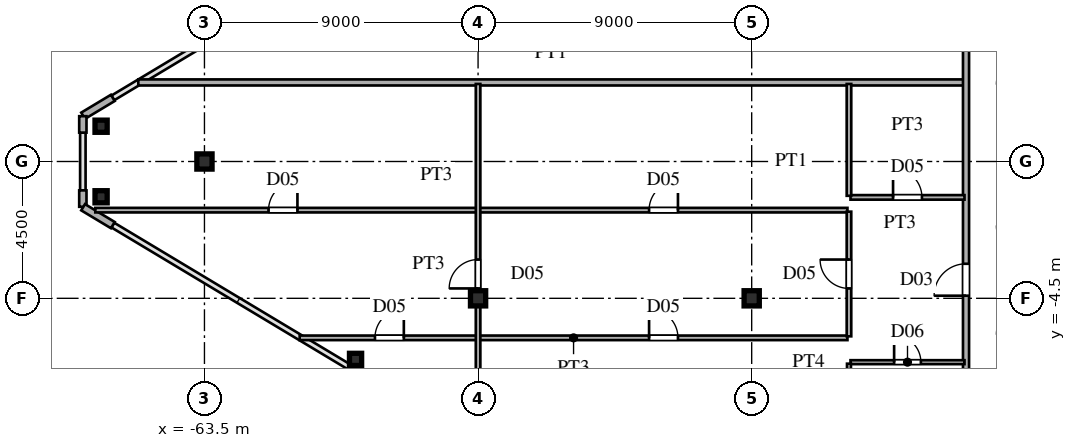
"""IFC4 building model, lengths in metres.
Left out: names, types, materials, properties, quantities, classifications, styles, units other than length and angle.
Written with IfcOpenShell. Run it as: python <this file> out.ifc"""

import sys

from ifc_helpers import new_model, si_unit, direction, frame, frame_2d, origin, origin_2d, place, context, subcontext, project, spatial, rectangle, hollow_rectangle, i_section, extrude, source, transform, mapped, element, fill, save


model = new_model("IFC4")
c1 = context("Model", 3, precision=1e-05, world=origin(), true_north=direction((0.0, 1.0)))
c2 = subcontext(c1, "Body", "Model", "MODEL_VIEW")
j1 = project(units=[si_unit("LENGTHUNIT", "METRE"), si_unit("PLANEANGLEUNIT", "RADIAN")], contexts=[c1])
p1 = place(None, origin())
s1 = spatial("IfcSite", under=j1, at=p1, CompositionType="ELEMENT")
p2 = place(p1, origin())
s2 = spatial("IfcBuilding", under=s1, at=p2, CompositionType="ELEMENT")
p3 = place(p2, frame((0.0, 0.0, 210.3)))
s3 = spatial("IfcBuildingStorey", under=s2, at=p3, CompositionType="ELEMENT", Elevation=210.3)
m1 = source(origin(), c2, "Body", "SweptSolid", [
    extrude(i_section(OverallWidth=0.5, OverallDepth=0.5, WebThickness=0.02, FlangeThickness=0.032, at=origin_2d()), origin(), (0.0, 0.0, 1.0), 3.6),
])
for number, where, z_axis, x_axis in (
    (1, (-45.5, -4.5, 0.0), (0.0, 0.0, 1.0), (1.0, 0.0, 0.0)),
    (2, (-54.5, -4.5, 0.0), (0.0, 0.0, 1.0), (1.0, 0.0, 0.0)),
    (3, (-63.5, 0.0, 0.0), (0.0, 0.0, 1.0), (1.0, 0.0, 0.0)),
):
    element("IfcColumn", number, at=place(p3, frame(where, z_axis=z_axis, x_axis=x_axis)), inside=s3, PredefinedType="COLUMN", context=c2, shape_type="MappedRepresentation", body=[
        mapped(m1, transform((0.0, 0.0, 0.0), scale=1.0)),
    ])
m2 = source(origin(), c2, "Body", "SweptSolid", [
    extrude(hollow_rectangle(XDim=0.4, YDim=0.4, WallThickness=0.016, at=origin_2d()), origin(), (0.0, 0.0, 1.0), 3.6),
])
for number, where, z_axis, x_axis in (
    (4, (-66.9, 1.16, 0.0), (0.0, 0.0, 1.0), (1.0, 0.0, 0.0)),
    (5, (-66.9, -1.16, 0.0), (0.0, 0.0, 1.0), (1.0, 0.0, 0.0)),
    (6, (-58.53, -6.509, 0.0), (0.0, 0.0, 1.0), (1.0, 0.0, 0.0)),
):
    element("IfcColumn", number, at=place(p3, frame(where, z_axis=z_axis, x_axis=x_axis)), inside=s3, PredefinedType="COLUMN", context=c2, shape_type="MappedRepresentation", body=[
        mapped(m2, transform((0.0, 0.0, 0.0), scale=1.0)),
    ])
p4 = place(p3, frame((-66.514, 2.092, 0.0), z_axis=(0.0, 0.0, 1.0), x_axis=(-0.85743623509, -0.514590228002, 0.0)))
e7 = element("IfcWall", 7, at=p4, inside=s3, PredefinedType="SOLIDWALL", context=c2, shape_type="SweptSolid", body=[
    extrude(rectangle(XDim=1.14, YDim=0.24, at=frame_2d((0.57, 0.0))), origin(), (0.0, 0.0, 1.0), 3.38),
])
for number, where, z_axis, x_axis in (
    (8, (-67.5, 1.49, 0.0), (0.0, 0.0, 1.0), (0.0, -1.0, 0.0)),
    (9, (-67.5, -0.95, 0.0), (0.0, 0.0, 1.0), (0.0, -1.0, 0.0)),
):
    element("IfcWall", number, at=place(p3, frame(where, z_axis=z_axis, x_axis=x_axis)), inside=s3, PredefinedType="SOLIDWALL", context=c2, shape_type="SweptSolid", body=[
        extrude(rectangle(XDim=0.54, YDim=0.24, at=frame_2d((0.27, 0.0))), origin(), (0.0, 0.0, 1.0), 3.38),
    ])
p5 = place(p3, frame((-67.491, -1.505, 0.0), z_axis=(0.0, 0.0, 1.0), x_axis=(0.85743623509, -0.514590228002, 0.0)))
e10 = element("IfcWall", 10, at=p5, inside=s3, PredefinedType="SOLIDWALL", context=c2, shape_type="SweptSolid", body=[
    extrude(rectangle(XDim=1.14, YDim=0.24, at=frame_2d((0.57, 0.0))), origin(), (0.0, 0.0, 1.0), 3.38),
])
p6 = place(p3, frame((-42.25, -6.6, 0.0), z_axis=(0.0, 0.0, 1.0), x_axis=(1.0, 0.0, 0.0)))
e11 = element("IfcWall", 11, at=p6, inside=s3, PredefinedType="PARTITIONING", context=c2, shape_type="SweptSolid", body=[
    extrude(rectangle(XDim=3.75, YDim=0.13, at=frame_2d((1.875, 0.0))), origin(), (0.0, 0.0, 1.0), 3.38),
])
p7 = place(p6, frame((1.435, 0.0, 0.0)))
e12 = element("IfcOpeningElement", 12, at=p7, cuts=e11, PredefinedType="OPENING", context=c2, shape_type="SweptSolid", body=[
    extrude(rectangle(XDim=0.88, YDim=2.1, at=frame_2d((0.44, 1.05))), frame((0.0, 0.075, 0.0), z_axis=(0.0, -1.0, 0.0), x_axis=(1.0, 0.0, 0.0)), (0.0, 0.0, 1.0), 0.15),
])
p8 = place(p3, frame((-60.368, -5.8, 0.0), z_axis=(0.0, 0.0, 1.0), x_axis=(1.0, 0.0, 0.0)))
e13 = element("IfcWall", 13, at=p8, inside=s3, PredefinedType="PARTITIONING", context=c2, shape_type="SweptSolid", body=[
    extrude(rectangle(XDim=18.018, YDim=0.15, at=frame_2d((9.009, 0.0))), origin(), (0.0, 0.0, 1.0), 3.38),
])
p9 = place(p8, frame((11.493, 0.0, 0.0)))
e14 = element("IfcOpeningElement", 14, at=p9, cuts=e13, PredefinedType="OPENING", context=c2, shape_type="SweptSolid", body=[
    extrude(rectangle(XDim=0.95, YDim=2.15, at=frame_2d((0.475, 1.075))), frame((0.0, 0.085, 0.0), z_axis=(0.0, -1.0, 0.0), x_axis=(1.0, 0.0, 0.0)), (0.0, 0.0, 1.0), 0.17),
])
p10 = place(p8, frame((2.476, 0.0, 0.0)))
e15 = element("IfcOpeningElement", 15, at=p10, cuts=e13, PredefinedType="OPENING", context=c2, shape_type="SweptSolid", body=[
    extrude(rectangle(XDim=0.95, YDim=2.15, at=frame_2d((0.475, 1.075))), frame((0.0, 0.085, 0.0), z_axis=(0.0, -1.0, 0.0), x_axis=(1.0, 0.0, 0.0)), (0.0, 0.0, 1.0), 0.17),
])
p11 = place(p3, frame((-67.09, -1.6, 0.0), z_axis=(0.0, 0.0, 1.0), x_axis=(1.0, 0.0, 0.0)))
e16 = element("IfcWall", 16, at=p11, inside=s3, PredefinedType="PARTITIONING", context=c2, shape_type="SweptSolid", body=[
    extrude(rectangle(XDim=24.74, YDim=0.15, at=frame_2d((12.37, 0.0))), origin(), (0.0, 0.0, 1.0), 3.38),
])
p12 = place(p11, frame((18.215, 0.0, 0.0)))
e17 = element("IfcOpeningElement", 17, at=p12, cuts=e16, PredefinedType="OPENING", context=c2, shape_type="SweptSolid", body=[
    extrude(rectangle(XDim=0.95, YDim=2.15, at=frame_2d((0.475, 1.075))), frame((0.0, 0.085, 0.0), z_axis=(0.0, -1.0, 0.0), x_axis=(1.0, 0.0, 0.0)), (0.0, 0.0, 1.0), 0.17),
])
p13 = place(p11, frame((5.698, 0.0, 0.0)))
e18 = element("IfcOpeningElement", 18, at=p13, cuts=e16, PredefinedType="OPENING", context=c2, shape_type="SweptSolid", body=[
    extrude(rectangle(XDim=0.95, YDim=2.15, at=frame_2d((0.475, 1.075))), frame((0.0, 0.085, 0.0), z_axis=(0.0, -1.0, 0.0), x_axis=(1.0, 0.0, 0.0)), (0.0, 0.0, 1.0), 0.17),
])
p14 = place(p3, frame((-42.25, -1.18, 0.0), z_axis=(0.0, 0.0, 1.0), x_axis=(1.0, 0.0, 0.0)))
e19 = element("IfcWall", 19, at=p14, inside=s3, PredefinedType="PARTITIONING", context=c2, shape_type="SweptSolid", body=[
    extrude(rectangle(XDim=3.75, YDim=0.15, at=frame_2d((1.875, 0.0))), origin(), (0.0, 0.0, 1.0), 3.38),
])
p15 = place(p14, frame((1.4, 0.0, 0.0)))
e20 = element("IfcOpeningElement", 20, at=p15, cuts=e19, PredefinedType="OPENING", context=c2, shape_type="SweptSolid", body=[
    extrude(rectangle(XDim=0.95, YDim=2.15, at=frame_2d((0.475, 1.075))), frame((0.0, 0.085, 0.0), z_axis=(0.0, -1.0, 0.0), x_axis=(1.0, 0.0, 0.0)), (0.0, 0.0, 1.0), 0.17),
])
p16 = place(p3, frame((-65.676, 2.6, 0.0), z_axis=(0.0, 0.0, 1.0), x_axis=(1.0, 0.0, 0.0)))
e21 = element("IfcWall", 21, at=p16, inside=s3, PredefinedType="PARTITIONING", context=c2, shape_type="SweptSolid", body=[
    extrude(rectangle(XDim=27.146, YDim=0.2, at=frame_2d((13.573, 0.0))), origin(), (0.0, 0.0, 1.0), 3.38),
])
p17 = place(p3, frame((-54.5, -9.335, 0.0), z_axis=(0.0, 0.0, 1.0), x_axis=(0.0, 1.0, 0.0)))
e22 = element("IfcWall", 22, at=p17, inside=s3, PredefinedType="PARTITIONING", context=c2, shape_type="SweptSolid", body=[
    extrude(rectangle(XDim=11.885, YDim=0.15, at=frame_2d((5.942, 0.0))), origin(), (0.0, 0.0, 1.0), 2.78),
])
p18 = place(p17, frame((5.16, 0.0, 0.0)))
e23 = element("IfcOpeningElement", 23, at=p18, cuts=e22, PredefinedType="OPENING", context=c2, shape_type="SweptSolid", body=[
    extrude(rectangle(XDim=0.95, YDim=2.15, at=frame_2d((0.475, 1.075))), frame((0.0, 0.085, 0.0), z_axis=(0.0, -1.0, 0.0), x_axis=(1.0, 0.0, 0.0)), (0.0, 0.0, 1.0), 0.17),
])
p19 = place(p3, frame((-42.3, -9.95, 0.0), z_axis=(0.0, 0.0, 1.0), x_axis=(0.0, 1.0, 0.0)))
e24 = element("IfcWall", 24, at=p19, inside=s3, PredefinedType="PARTITIONING", context=c2, shape_type="SweptSolid", body=[
    extrude(rectangle(XDim=3.3, YDim=0.13, at=frame_2d((1.65, 0.0))), origin(), (0.0, 0.0, 1.0), 3.38),
])
p20 = place(p3, frame((-42.3, -5.75, 0.0), z_axis=(0.0, 0.0, 1.0), x_axis=(0.0, 1.0, 0.0)))
e25 = element("IfcWall", 25, at=p20, inside=s3, PredefinedType="PARTITIONING", context=c2, shape_type="SweptSolid", body=[
    extrude(rectangle(XDim=4.1, YDim=0.15, at=frame_2d((2.05, 0.0))), origin(), (0.0, 0.0, 1.0), 3.38),
])
p21 = place(p20, frame((1.575, 0.0, 0.0)))
e26 = element("IfcOpeningElement", 26, at=p21, cuts=e25, PredefinedType="OPENING", context=c2, shape_type="SweptSolid", body=[
    extrude(rectangle(XDim=0.95, YDim=2.15, at=frame_2d((0.475, 1.075))), frame((0.0, 0.085, 0.0), z_axis=(0.0, -1.0, 0.0), x_axis=(1.0, 0.0, 0.0)), (0.0, 0.0, 1.0), 0.17),
])
p22 = place(p3, frame((-42.3, -1.128, 0.0), z_axis=(0.0, 0.0, 1.0), x_axis=(0.0, 1.0, 0.0)))
e27 = element("IfcWall", 27, at=p22, inside=s3, PredefinedType="PARTITIONING", context=c2, shape_type="SweptSolid", body=[
    extrude(rectangle(XDim=3.678, YDim=0.15, at=frame_2d((1.839, 0.0))), origin(), (0.0, 0.0, 1.0), 3.38),
])
p23 = place(p3, frame((-38.45, -15.715, 0.0), z_axis=(0.0, 0.0, 1.0), x_axis=(0.0, 1.0, 0.0)))
e28 = element("IfcWall", 28, at=p23, inside=s3, PredefinedType="PARTITIONING", context=c2, shape_type="SweptSolid", body=[
    extrude(rectangle(XDim=31.43, YDim=0.2, at=frame_2d((15.715, 0.0))), origin(), (0.0, 0.0, 1.0), 3.38),
])
p24 = place(p23, frame((2.29, 0.0, 0.0)))
e29 = element("IfcOpeningElement", 29, at=p24, cuts=e28, PredefinedType="OPENING", context=c2, shape_type="SweptSolid", body=[
    extrude(rectangle(XDim=1.05, YDim=2.25, at=frame_2d((0.525, 1.125))), frame((0.0, 0.11, 0.0), z_axis=(0.0, -1.0, 0.0), x_axis=(1.0, 0.0, 0.0)), (0.0, 0.0, 1.0), 0.22),
])
p25 = place(p23, frame((11.301, 0.0, 0.0)))
e30 = element("IfcOpeningElement", 30, at=p25, cuts=e28, PredefinedType="OPENING", context=c2, shape_type="SweptSolid", body=[
    extrude(rectangle(XDim=1.05, YDim=2.25, at=frame_2d((0.525, 1.125))), frame((0.0, 0.11, 0.0), z_axis=(0.0, -1.0, 0.0), x_axis=(1.0, 0.0, 0.0)), (0.0, 0.0, 1.0), 0.22),
])
p26 = place(p23, frame((24.39, 0.0, 0.0)))
e31 = element("IfcOpeningElement", 31, at=p26, cuts=e28, PredefinedType="OPENING", context=c2, shape_type="SweptSolid", body=[
    extrude(rectangle(XDim=1.05, YDim=2.25, at=frame_2d((0.525, 1.125))), frame((0.0, 0.11, 0.0), z_axis=(0.0, -1.0, 0.0), x_axis=(1.0, 0.0, 0.0)), (0.0, 0.0, 1.0), 0.22),
])
m3 = source(origin(), c2, "Body", "SweptSolid", [
    extrude(rectangle(XDim=0.88, YDim=2.1, at=frame_2d((0.44, 1.05))), frame((0.0, 0.025, 0.0), z_axis=(0.0, -1.0, 0.0), x_axis=(1.0, 0.0, 0.0)), (0.0, 0.0, 1.0), 0.05),
])
p27 = place(p7, origin())
e32 = element("IfcDoor", 32, at=p27, inside=s3, OperationType="SINGLE_SWING_LEFT", PredefinedType="DOOR", context=c2, shape_type="MappedRepresentation", body=[
    mapped(m3, transform((0.0, 0.0, 0.0), scale=1.0)),
])
fill(e12, e32)
m4 = source(origin(), c2, "Body", "SweptSolid", [
    extrude(rectangle(XDim=0.95, YDim=2.15, at=frame_2d((0.475, 1.075))), frame((0.0, 0.025, 0.0), z_axis=(0.0, -1.0, 0.0), x_axis=(1.0, 0.0, 0.0)), (0.0, 0.0, 1.0), 0.05),
])
p28 = place(p9, origin())
e33 = element("IfcDoor", 33, at=p28, inside=s3, OperationType="SINGLE_SWING_LEFT", PredefinedType="DOOR", context=c2, shape_type="MappedRepresentation", body=[
    mapped(m4, transform((0.0, 0.0, 0.0), scale=1.0)),
])
fill(e14, e33)
p29 = place(p10, origin())
e34 = element("IfcDoor", 34, at=p29, inside=s3, OperationType="SINGLE_SWING_RIGHT", PredefinedType="DOOR", context=c2, shape_type="MappedRepresentation", body=[
    mapped(m4, transform((0.0, 0.0, 0.0), scale=1.0)),
])
fill(e15, e34)
p30 = place(p12, origin())
e35 = element("IfcDoor", 35, at=p30, inside=s3, OperationType="SINGLE_SWING_RIGHT", PredefinedType="DOOR", context=c2, shape_type="MappedRepresentation", body=[
    mapped(m4, transform((0.0, 0.0, 0.0), scale=1.0)),
])
fill(e17, e35)
p31 = place(p13, origin())
e36 = element("IfcDoor", 36, at=p31, inside=s3, OperationType="SINGLE_SWING_RIGHT", PredefinedType="DOOR", context=c2, shape_type="MappedRepresentation", body=[
    mapped(m4, transform((0.0, 0.0, 0.0), scale=1.0)),
])
fill(e18, e36)
p32 = place(p15, origin())
e37 = element("IfcDoor", 37, at=p32, inside=s3, OperationType="SINGLE_SWING_LEFT", PredefinedType="DOOR", context=c2, shape_type="MappedRepresentation", body=[
    mapped(m4, transform((0.0, 0.0, 0.0), scale=1.0)),
])
fill(e20, e37)
p33 = place(p18, origin())
e38 = element("IfcDoor", 38, at=p33, inside=s3, OperationType="SINGLE_SWING_LEFT", PredefinedType="DOOR", context=c2, shape_type="MappedRepresentation", body=[
    mapped(m4, transform((0.0, 0.0, 0.0), scale=1.0)),
])
fill(e23, e38)
p34 = place(p21, origin())
e39 = element("IfcDoor", 39, at=p34, inside=s3, OperationType="SINGLE_SWING_RIGHT", PredefinedType="DOOR", context=c2, shape_type="MappedRepresentation", body=[
    mapped(m4, transform((0.0, 0.0, 0.0), scale=1.0)),
])
fill(e26, e39)
m5 = source(origin(), c2, "Body", "SweptSolid", [
    extrude(rectangle(XDim=1.05, YDim=2.25, at=frame_2d((0.525, 1.125))), frame((0.0, 0.025, 0.0), z_axis=(0.0, -1.0, 0.0), x_axis=(1.0, 0.0, 0.0)), (0.0, 0.0, 1.0), 0.05),
])
p35 = place(p25, origin())
e40 = element("IfcDoor", 40, at=p35, inside=s3, OperationType="SINGLE_SWING_LEFT", PredefinedType="DOOR", context=c2, shape_type="MappedRepresentation", body=[
    mapped(m5, transform((0.0, 0.0, 0.0), scale=1.0)),
])
fill(e30, e40)
save(model, sys.argv[1])
